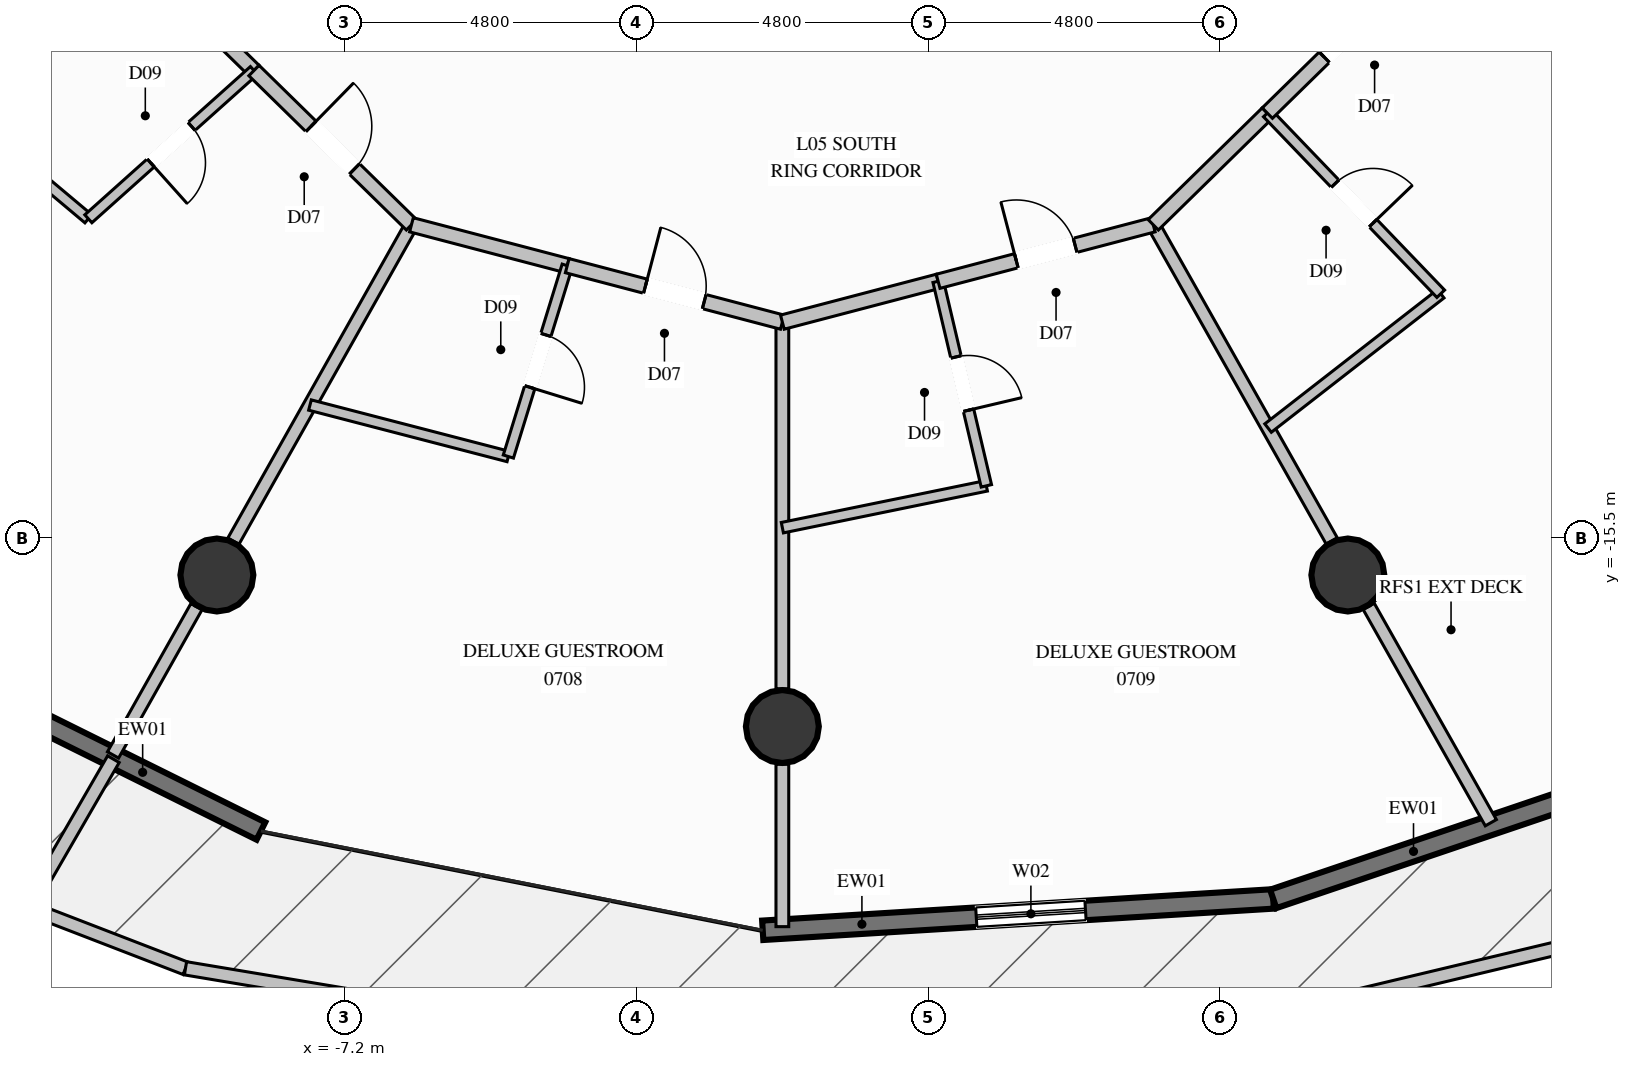
"""IFC4 building model, lengths in metres.
Left out: names, types, materials, properties, quantities, classifications, styles, units other than length and angle.
Written with IfcOpenShell. Run it as: python <this file> out.ifc"""

import sys

from ifc_helpers import new_model, si_unit, direction, frame, frame_2d, origin, origin_2d, place, context, subcontext, project, spatial, rectangle, circle, extrude, element, fill, save


model = new_model("IFC4")
c1 = context("Model", 3, precision=1e-05, world=origin(), true_north=direction((0.0, 1.0)))
c2 = subcontext(c1, "Body", "Model", "MODEL_VIEW")
j1 = project(units=[si_unit("LENGTHUNIT", "METRE"), si_unit("PLANEANGLEUNIT", "RADIAN")], contexts=[c1])
p1 = place(None, origin())
s1 = spatial("IfcSite", under=j1, at=p1, CompositionType="ELEMENT")
p2 = place(p1, origin())
s2 = spatial("IfcBuilding", under=s1, at=p2, CompositionType="ELEMENT")
p3 = place(p2, frame((0.0, 0.0, 28.4)))
s3 = spatial("IfcBuildingStorey", under=s2, at=p3, CompositionType="ELEMENT", Elevation=28.4)
for number, where, z_axis, x_axis in (
    (1, (-9.3, -16.108, 0.0), (0.0, 0.0, 1.0), (1.0, 0.0, 0.0)),
    (2, (0.0, -18.6, 0.0), (0.0, 0.0, 1.0), (1.0, 0.0, 0.0)),
    (3, (9.3, -16.108, 0.0), (0.0, 0.0, 1.0), (1.0, 0.0, 0.0)),
):
    element("IfcColumn", number, at=place(p3, frame(where, z_axis=z_axis, x_axis=x_axis)), inside=s3, PredefinedType="COLUMN", context=c2, shape_type="SweptSolid", body=[
        extrude(circle(Radius=0.6, at=origin_2d()), origin(), (0.0, 0.0, 1.0), 3.6),
    ])
p4 = place(p3, frame((-8.576, -20.318, 0.0), z_axis=(0.0, 0.0, 1.0), x_axis=(-0.895818759339, 0.444419565743, 0.0)))
e4 = element("IfcWall", 4, at=p4, inside=s3, PredefinedType="SOLIDWALL", context=c2, shape_type="SweptSolid", body=[
    extrude(rectangle(XDim=8.15, YDim=0.32, at=frame_2d((4.075, 0.0))), origin(), (0.0, 0.0, 1.0), 3.34),
])
p5 = place(p4, frame((4.592, 0.0, 0.35)))
e5 = element("IfcOpeningElement", 5, at=p5, cuts=e4, PredefinedType="OPENING", context=c2, shape_type="SweptSolid", body=[
    extrude(rectangle(XDim=1.8, YDim=2.6, at=frame_2d((0.9, 1.3))), frame((0.0, 0.17, 0.0), z_axis=(0.0, -1.0, 0.0), x_axis=(1.0, 0.0, 0.0)), (0.0, 0.0, 1.0), 0.34),
])
p6 = place(p3, frame((8.073, -21.435, 0.0), z_axis=(0.0, 0.0, 1.0), x_axis=(-0.998117750792, -0.06132663005, 0.0)))
e6 = element("IfcWall", 6, at=p6, inside=s3, PredefinedType="SOLIDWALL", context=c2, shape_type="SweptSolid", body=[
    extrude(rectangle(XDim=8.412, YDim=0.32, at=frame_2d((4.206, 0.0))), origin(), (0.0, 0.0, 1.0), 3.34),
])
p7 = place(p6, frame((3.093, 0.0, 0.35)))
e7 = element("IfcOpeningElement", 7, at=p7, cuts=e6, PredefinedType="OPENING", context=c2, shape_type="SweptSolid", body=[
    extrude(rectangle(XDim=1.8, YDim=2.6, at=frame_2d((0.9, 1.3))), frame((0.0, 0.17, 0.0), z_axis=(0.0, -1.0, 0.0), x_axis=(1.0, 0.0, 0.0)), (0.0, 0.0, 1.0), 0.34),
])
p8 = place(p3, frame((15.793, -18.821, 0.0), z_axis=(0.0, 0.0, 1.0), x_axis=(-0.94717495877, -0.320717317085, 0.0)))
e8 = element("IfcWall", 8, at=p8, inside=s3, PredefinedType="SOLIDWALL", context=c2, shape_type="SweptSolid", body=[
    extrude(rectangle(XDim=8.151, YDim=0.32, at=frame_2d((4.075, 0.0))), origin(), (0.0, 0.0, 1.0), 3.34),
])
p9 = place(p8, frame((1.229, 0.0, 0.35)))
e9 = element("IfcOpeningElement", 9, at=p9, cuts=e8, PredefinedType="OPENING", context=c2, shape_type="SweptSolid", body=[
    extrude(rectangle(XDim=1.8, YDim=2.6, at=frame_2d((0.9, 1.3))), frame((0.0, 0.17, 0.0), z_axis=(0.0, -1.0, 0.0), x_axis=(1.0, 0.0, 0.0)), (0.0, 0.0, 1.0), 0.34),
])
p10 = place(p3, frame((-11.002, -19.137, 0.0), z_axis=(0.0, 0.0, 1.0), x_axis=(-0.500102771102, -0.86596606073, 0.0)))
e10 = element("IfcWall", 10, at=p10, inside=s3, PredefinedType="PARAPET", context=c2, shape_type="SweptSolid", body=[
    extrude(rectangle(XDim=2.815, YDim=0.22, at=frame_2d((1.408, 0.0))), origin(), (0.0, 0.0, 1.0), 1.15),
])
p11 = place(p3, frame((-12.41, -21.575, 0.0), z_axis=(0.0, 0.0, 1.0), x_axis=(0.932949001639, -0.360008555927, 0.0)))
e11 = element("IfcWall", 11, at=p11, inside=s3, PredefinedType="PARAPET", context=c2, shape_type="SweptSolid", body=[
    extrude(rectangle(XDim=2.781, YDim=0.22, at=frame_2d((1.39, 0.0))), origin(), (0.0, 0.0, 1.0), 1.15),
])
p12 = place(p3, frame((-9.816, -22.576, 0.0), z_axis=(0.0, 0.0, 1.0), x_axis=(0.98635584135, -0.164627319226, 0.0)))
e12 = element("IfcWall", 12, at=p12, inside=s3, PredefinedType="PARAPET", context=c2, shape_type="SweptSolid", body=[
    extrude(rectangle(XDim=8.323, YDim=0.22, at=frame_2d((4.161, 0.0))), origin(), (0.0, 0.0, 1.0), 1.15),
])
p13 = place(p3, frame((6.711, -23.685, 0.0), z_axis=(0.0, 0.0, 1.0), x_axis=(0.972686482299, 0.232122827727, 0.0)))
e13 = element("IfcWall", 13, at=p13, inside=s3, PredefinedType="PARAPET", context=c2, shape_type="SweptSolid", body=[
    extrude(rectangle(XDim=8.082, YDim=0.22, at=frame_2d((4.041, 0.0))), origin(), (0.0, 0.0, 1.0), 1.15),
])
p14 = place(p3, frame((-10.566, -5.975, 0.0), z_axis=(0.0, 0.0, 1.0), x_axis=(-0.861473203585, -0.507803032194, 0.0)))
e14 = element("IfcWall", 14, at=p14, inside=s3, PredefinedType="PARTITIONING", context=c2, shape_type="SweptSolid", body=[
    extrude(rectangle(XDim=5.845, YDim=0.21, at=frame_2d((2.922, 0.0))), origin(), (0.0, 0.0, 1.0), 2.708),
])
p15 = place(p3, frame((-6.1, -10.349, 0.0), z_axis=(0.0, 0.0, 1.0), x_axis=(-0.490503945764, -0.871438970433, 0.0)))
e15 = element("IfcWall", 15, at=p15, inside=s3, PredefinedType="PARTITIONING", context=c2, shape_type="SweptSolid", body=[
    extrude(rectangle(XDim=5.969, YDim=0.21, at=frame_2d((2.985, 0.0))), origin(), (0.0, 0.0, 1.0), 2.708),
])
p16 = place(p3, frame((-9.636, -16.629, 0.0), z_axis=(0.0, 0.0, 1.0), x_axis=(-0.490451821351, -0.871468307475, 0.0)))
e16 = element("IfcWall", 16, at=p16, inside=s3, PredefinedType="PARTITIONING", context=c2, shape_type="SweptSolid", body=[
    extrude(rectangle(XDim=2.798, YDim=0.21, at=frame_2d((1.399, 0.0))), origin(), (0.0, 0.0, 1.0), 3.34),
])
p17 = place(p3, frame((0.0, -11.95, 0.0), z_axis=(0.0, 0.0, 1.0), x_axis=(0.0, -1.0, 0.0)))
e17 = element("IfcWall", 17, at=p17, inside=s3, PredefinedType="PARTITIONING", context=c2, shape_type="SweptSolid", body=[
    extrude(rectangle(XDim=6.03, YDim=0.21, at=frame_2d((3.015, 0.0))), origin(), (0.0, 0.0, 1.0), 2.708),
])
p18 = place(p3, frame((0.0, -19.22, 0.0), z_axis=(0.0, 0.0, 1.0), x_axis=(0.0, -1.0, 0.0)))
e18 = element("IfcWall", 18, at=p18, inside=s3, PredefinedType="PARTITIONING", context=c2, shape_type="SweptSolid", body=[
    extrude(rectangle(XDim=2.671, YDim=0.21, at=frame_2d((1.335, 0.0))), origin(), (0.0, 0.0, 1.0), 3.34),
])
p19 = place(p3, frame((6.1, -10.349, 0.0), z_axis=(0.0, 0.0, 1.0), x_axis=(0.491652896219, -0.870791266401, 0.0)))
e19 = element("IfcWall", 19, at=p19, inside=s3, PredefinedType="PARTITIONING", context=c2, shape_type="SweptSolid", body=[
    extrude(rectangle(XDim=5.969, YDim=0.21, at=frame_2d((2.985, 0.0))), origin(), (0.0, 0.0, 1.0), 2.708),
])
p20 = place(p3, frame((9.643, -16.624, 0.0), z_axis=(0.0, 0.0, 1.0), x_axis=(0.491698874435, -0.87076530528, 0.0)))
e20 = element("IfcWall", 20, at=p20, inside=s3, PredefinedType="PARTITIONING", context=c2, shape_type="SweptSolid", body=[
    extrude(rectangle(XDim=4.086, YDim=0.21, at=frame_2d((2.043, 0.0))), origin(), (0.0, 0.0, 1.0), 3.34),
])
p21 = place(p3, frame((10.566, -5.975, 0.0), z_axis=(0.0, 0.0, 1.0), x_axis=(0.862217531027, -0.506538181374, 0.0)))
e21 = element("IfcWall", 21, at=p21, inside=s3, PredefinedType="PARTITIONING", context=c2, shape_type="SweptSolid", body=[
    extrude(rectangle(XDim=5.845, YDim=0.21, at=frame_2d((2.923, 0.0))), origin(), (0.0, 0.0, 1.0), 2.708),
])
p22 = place(p3, frame((-10.566, -5.975, 0.0), z_axis=(0.0, 0.0, 1.0), x_axis=(0.714506552913, -0.699628748584, 0.0)))
e22 = element("IfcWall", 22, at=p22, inside=s3, PredefinedType="PARTITIONING", context=c2, shape_type="SweptSolid", body=[
    extrude(rectangle(XDim=2.625, YDim=0.24, at=frame_2d((1.313, 0.0))), origin(), (0.0, 0.0, 1.0), 3.34),
])
p23 = place(p3, frame((-14.055, -8.032, 0.0), z_axis=(0.0, 0.0, 1.0), x_axis=(0.765749489357, -0.643138958196, 0.0)))
e23 = element("IfcWall", 23, at=p23, inside=s3, PredefinedType="PLUMBINGWALL", context=c2, shape_type="SweptSolid", body=[
    extrude(rectangle(XDim=3.449, YDim=0.175, at=frame_2d((1.724, 0.0))), origin(), (0.0, 0.0, 1.0), 3.34),
])
p24 = place(p3, frame((-8.69, -7.812, 0.0), z_axis=(0.0, 0.0, 1.0), x_axis=(-0.745157470099, -0.666888554975, 0.0)))
e24 = element("IfcWall", 24, at=p24, inside=s3, PredefinedType="PLUMBINGWALL", context=c2, shape_type="SweptSolid", body=[
    extrude(rectangle(XDim=3.656, YDim=0.175, at=frame_2d((1.828, 0.0))), origin(), (0.0, 0.0, 1.0), 3.34),
])
p25 = place(p24, frame((1.378, 0.0, 0.0)))
e25 = element("IfcOpeningElement", 25, at=p25, cuts=e24, PredefinedType="OPENING", context=c2, shape_type="SweptSolid", body=[
    extrude(rectangle(XDim=0.9, YDim=2.1, at=frame_2d((0.45, 1.05))), frame((0.0, 0.098, 0.0), z_axis=(0.0, -1.0, 0.0), x_axis=(1.0, 0.0, 0.0)), (0.0, 0.0, 1.0), 0.195),
])
p26 = place(p3, frame((-8.69, -7.812, 0.0), z_axis=(0.0, 0.0, 1.0), x_axis=(0.714342093268, -0.699796666029, 0.0)))
e26 = element("IfcWall", 26, at=p26, inside=s3, PredefinedType="PARTITIONING", context=c2, shape_type="SweptSolid", body=[
    extrude(rectangle(XDim=3.625, YDim=0.24, at=frame_2d((1.813, 0.0))), origin(), (0.0, 0.0, 1.0), 3.34),
])
p27 = place(p26, frame((1.313, 0.0, 0.0)))
e27 = element("IfcOpeningElement", 27, at=p27, cuts=e26, PredefinedType="OPENING", context=c2, shape_type="SweptSolid", body=[
    extrude(rectangle(XDim=1.0, YDim=2.2, at=frame_2d((0.5, 1.1))), frame((0.0, 0.13, 0.0), z_axis=(0.0, -1.0, 0.0), x_axis=(1.0, 0.0, 0.0)), (0.0, 0.0, 1.0), 0.26),
])
p28 = place(p3, frame((-6.1, -10.349, 0.0), z_axis=(0.0, 0.0, 1.0), x_axis=(0.967291490053, -0.253667446219, 0.0)))
e28 = element("IfcWall", 28, at=p28, inside=s3, PredefinedType="PARTITIONING", context=c2, shape_type="SweptSolid", body=[
    extrude(rectangle(XDim=2.649, YDim=0.24, at=frame_2d((1.324, 0.0))), origin(), (0.0, 0.0, 1.0), 3.34),
])
p29 = place(p3, frame((-7.769, -13.313, 0.0), z_axis=(0.0, 0.0, 1.0), x_axis=(0.96792648556, -0.251233593596, 0.0)))
e29 = element("IfcWall", 29, at=p29, inside=s3, PredefinedType="PLUMBINGWALL", context=c2, shape_type="SweptSolid", body=[
    extrude(rectangle(XDim=3.371, YDim=0.175, at=frame_2d((1.686, 0.0))), origin(), (0.0, 0.0, 1.0), 3.34),
])
p30 = place(p3, frame((-3.538, -11.021, 0.0), z_axis=(0.0, 0.0, 1.0), x_axis=(-0.294696857094, -0.955590792347, 0.0)))
e30 = element("IfcWall", 30, at=p30, inside=s3, PredefinedType="PLUMBINGWALL", context=c2, shape_type="SweptSolid", body=[
    extrude(rectangle(XDim=3.285, YDim=0.175, at=frame_2d((1.643, 0.0))), origin(), (0.0, 0.0, 1.0), 3.34),
])
p31 = place(p30, frame((1.192, 0.0, 0.0)))
e31 = element("IfcOpeningElement", 31, at=p31, cuts=e30, PredefinedType="OPENING", context=c2, shape_type="SweptSolid", body=[
    extrude(rectangle(XDim=0.9, YDim=2.1, at=frame_2d((0.45, 1.05))), frame((0.0, 0.098, 0.0), z_axis=(0.0, -1.0, 0.0), x_axis=(1.0, 0.0, 0.0)), (0.0, 0.0, 1.0), 0.195),
])
p32 = place(p3, frame((-3.538, -11.021, 0.0), z_axis=(0.0, 0.0, 1.0), x_axis=(0.96721703222, -0.253951201187, 0.0)))
e32 = element("IfcWall", 32, at=p32, inside=s3, PredefinedType="PARTITIONING", context=c2, shape_type="SweptSolid", body=[
    extrude(rectangle(XDim=3.658, YDim=0.24, at=frame_2d((1.829, 0.0))), origin(), (0.0, 0.0, 1.0), 2.919),
])
p33 = place(p32, frame((1.329, 0.0, 0.0)))
e33 = element("IfcOpeningElement", 33, at=p33, cuts=e32, PredefinedType="OPENING", context=c2, shape_type="SweptSolid", body=[
    extrude(rectangle(XDim=1.0, YDim=2.2, at=frame_2d((0.5, 1.1))), frame((0.0, 0.13, 0.0), z_axis=(0.0, -1.0, 0.0), x_axis=(1.0, 0.0, 0.0)), (0.0, 0.0, 1.0), 0.26),
])
p34 = place(p3, frame((0.0, -11.95, 0.0), z_axis=(0.0, 0.0, 1.0), x_axis=(0.967291490053, 0.253667446219, 0.0)))
e34 = element("IfcWall", 34, at=p34, inside=s3, PredefinedType="PARTITIONING", context=c2, shape_type="SweptSolid", body=[
    extrude(rectangle(XDim=2.649, YDim=0.24, at=frame_2d((1.324, 0.0))), origin(), (0.0, 0.0, 1.0), 2.919),
])
p35 = place(p3, frame((0.0, -15.33, 0.0), z_axis=(0.0, 0.0, 1.0), x_axis=(0.979614932167, 0.20088450581, 0.0)))
e35 = element("IfcWall", 35, at=p35, inside=s3, PredefinedType="PLUMBINGWALL", context=c2, shape_type="SweptSolid", body=[
    extrude(rectangle(XDim=3.425, YDim=0.175, at=frame_2d((1.712, 0.0))), origin(), (0.0, 0.0, 1.0), 3.34),
])
p36 = place(p3, frame((2.562, -11.278, 0.0), z_axis=(0.0, 0.0, 1.0), x_axis=(0.229433036384, -0.973324448381, 0.0)))
e36 = element("IfcWall", 36, at=p36, inside=s3, PredefinedType="PLUMBINGWALL", context=c2, shape_type="SweptSolid", body=[
    extrude(rectangle(XDim=3.456, YDim=0.175, at=frame_2d((1.728, 0.0))), origin(), (0.0, 0.0, 1.0), 3.34),
])
p37 = place(p36, frame((1.278, 0.0, 0.0)))
e37 = element("IfcOpeningElement", 37, at=p37, cuts=e36, PredefinedType="OPENING", context=c2, shape_type="SweptSolid", body=[
    extrude(rectangle(XDim=0.9, YDim=2.1, at=frame_2d((0.45, 1.05))), frame((0.0, 0.098, 0.0), z_axis=(0.0, -1.0, 0.0), x_axis=(1.0, 0.0, 0.0)), (0.0, 0.0, 1.0), 0.195),
])
p38 = place(p3, frame((2.562, -11.278, 0.0), z_axis=(0.0, 0.0, 1.0), x_axis=(0.96721703222, 0.253951201187, 0.0)))
e38 = element("IfcWall", 38, at=p38, inside=s3, PredefinedType="PARTITIONING", context=c2, shape_type="SweptSolid", body=[
    extrude(rectangle(XDim=3.658, YDim=0.24, at=frame_2d((1.829, 0.0))), origin(), (0.0, 0.0, 1.0), 2.919),
])
p39 = place(p38, frame((1.329, 0.0, 0.0)))
e39 = element("IfcOpeningElement", 39, at=p39, cuts=e38, PredefinedType="OPENING", context=c2, shape_type="SweptSolid", body=[
    extrude(rectangle(XDim=1.0, YDim=2.2, at=frame_2d((0.5, 1.1))), frame((0.0, 0.13, 0.0), z_axis=(0.0, -1.0, 0.0), x_axis=(1.0, 0.0, 0.0)), (0.0, 0.0, 1.0), 0.26),
])
p40 = place(p3, frame((6.1, -10.349, 0.0), z_axis=(0.0, 0.0, 1.0), x_axis=(0.714460071513, 0.69967621527, 0.0)))
e40 = element("IfcWall", 40, at=p40, inside=s3, PredefinedType="PARTITIONING", context=c2, shape_type="SweptSolid", body=[
    extrude(rectangle(XDim=2.626, YDim=0.24, at=frame_2d((1.313, 0.0))), origin(), (0.0, 0.0, 1.0), 3.34),
])
p41 = place(p3, frame((7.988, -13.692, 0.0), z_axis=(0.0, 0.0, 1.0), x_axis=(0.78932298539, 0.613978195651, 0.0)))
e41 = element("IfcWall", 41, at=p41, inside=s3, PredefinedType="PLUMBINGWALL", context=c2, shape_type="SweptSolid", body=[
    extrude(rectangle(XDim=3.598, YDim=0.175, at=frame_2d((1.799, 0.0))), origin(), (0.0, 0.0, 1.0), 3.34),
])
p42 = place(p3, frame((7.976, -8.512, 0.0), z_axis=(0.0, 0.0, 1.0), x_axis=(0.692493571669, -0.721424045342, 0.0)))
e42 = element("IfcWall", 42, at=p42, inside=s3, PredefinedType="PLUMBINGWALL", context=c2, shape_type="SweptSolid", body=[
    extrude(rectangle(XDim=4.118, YDim=0.175, at=frame_2d((2.059, 0.0))), origin(), (0.0, 0.0, 1.0), 3.34),
])
p43 = place(p42, frame((1.609, 0.0, 0.0)))
e43 = element("IfcOpeningElement", 43, at=p43, cuts=e42, PredefinedType="OPENING", context=c2, shape_type="SweptSolid", body=[
    extrude(rectangle(XDim=0.9, YDim=2.1, at=frame_2d((0.45, 1.05))), frame((0.0, 0.098, 0.0), z_axis=(0.0, -1.0, 0.0), x_axis=(1.0, 0.0, 0.0)), (0.0, 0.0, 1.0), 0.195),
])
p44 = place(p3, frame((7.976, -8.512, 0.0), z_axis=(0.0, 0.0, 1.0), x_axis=(0.714375756875, 0.699762301064, 0.0)))
e44 = element("IfcWall", 44, at=p44, inside=s3, PredefinedType="PARTITIONING", context=c2, shape_type="SweptSolid", body=[
    extrude(rectangle(XDim=3.625, YDim=0.24, at=frame_2d((1.812, 0.0))), origin(), (0.0, 0.0, 1.0), 3.34),
])
p45 = place(p44, frame((1.313, 0.0, 0.0)))
e45 = element("IfcOpeningElement", 45, at=p45, cuts=e44, PredefinedType="OPENING", context=c2, shape_type="SweptSolid", body=[
    extrude(rectangle(XDim=1.0, YDim=2.2, at=frame_2d((0.5, 1.1))), frame((0.0, 0.13, 0.0), z_axis=(0.0, -1.0, 0.0), x_axis=(1.0, 0.0, 0.0)), (0.0, 0.0, 1.0), 0.26),
])
p46 = place(p7, origin())
e46 = element("IfcWindow", 46, at=p46, inside=s3, PartitioningType="SINGLE_PANEL", PredefinedType="WINDOW", context=c2, shape_type="SweptSolid", body=[
    extrude(rectangle(XDim=1.8, YDim=2.6, at=frame_2d((0.9, 1.3))), frame((0.0, 0.03, 0.0), z_axis=(0.0, -1.0, 0.0), x_axis=(1.0, 0.0, 0.0)), (0.0, 0.0, 1.0), 0.06),
])
fill(e7, e46)
p47 = place(p25, origin())
e47 = element("IfcDoor", 47, at=p47, inside=s3, OperationType="SINGLE_SWING_RIGHT", PredefinedType="DOOR", context=c2, shape_type="SweptSolid", body=[
    extrude(rectangle(XDim=0.9, YDim=2.1, at=frame_2d((0.45, 1.05))), frame((0.0, 0.025, 0.0), z_axis=(0.0, -1.0, 0.0), x_axis=(1.0, 0.0, 0.0)), (0.0, 0.0, 1.0), 0.05),
])
fill(e25, e47)
p48 = place(p27, origin())
e48 = element("IfcDoor", 48, at=p48, inside=s3, OperationType="SINGLE_SWING_LEFT", PredefinedType="DOOR", context=c2, shape_type="SweptSolid", body=[
    extrude(rectangle(XDim=1.0, YDim=2.2, at=frame_2d((0.5, 1.1))), frame((0.0, 0.025, 0.0), z_axis=(0.0, -1.0, 0.0), x_axis=(1.0, 0.0, 0.0)), (0.0, 0.0, 1.0), 0.05),
])
fill(e27, e48)
p49 = place(p31, origin())
e49 = element("IfcDoor", 49, at=p49, inside=s3, OperationType="SINGLE_SWING_RIGHT", PredefinedType="DOOR", context=c2, shape_type="SweptSolid", body=[
    extrude(rectangle(XDim=0.9, YDim=2.1, at=frame_2d((0.45, 1.05))), frame((0.0, 0.025, 0.0), z_axis=(0.0, -1.0, 0.0), x_axis=(1.0, 0.0, 0.0)), (0.0, 0.0, 1.0), 0.05),
])
fill(e31, e49)
p50 = place(p33, origin())
e50 = element("IfcDoor", 50, at=p50, inside=s3, OperationType="SINGLE_SWING_LEFT", PredefinedType="DOOR", context=c2, shape_type="SweptSolid", body=[
    extrude(rectangle(XDim=1.0, YDim=2.2, at=frame_2d((0.5, 1.1))), frame((0.0, 0.025, 0.0), z_axis=(0.0, -1.0, 0.0), x_axis=(1.0, 0.0, 0.0)), (0.0, 0.0, 1.0), 0.05),
])
fill(e33, e50)
p51 = place(p37, origin())
e51 = element("IfcDoor", 51, at=p51, inside=s3, OperationType="SINGLE_SWING_RIGHT", PredefinedType="DOOR", context=c2, shape_type="SweptSolid", body=[
    extrude(rectangle(XDim=0.9, YDim=2.1, at=frame_2d((0.45, 1.05))), frame((0.0, 0.025, 0.0), z_axis=(0.0, -1.0, 0.0), x_axis=(1.0, 0.0, 0.0)), (0.0, 0.0, 1.0), 0.05),
])
fill(e37, e51)
p52 = place(p39, origin())
e52 = element("IfcDoor", 52, at=p52, inside=s3, OperationType="SINGLE_SWING_LEFT", PredefinedType="DOOR", context=c2, shape_type="SweptSolid", body=[
    extrude(rectangle(XDim=1.0, YDim=2.2, at=frame_2d((0.5, 1.1))), frame((0.0, 0.025, 0.0), z_axis=(0.0, -1.0, 0.0), x_axis=(1.0, 0.0, 0.0)), (0.0, 0.0, 1.0), 0.05),
])
fill(e39, e52)
p53 = place(p43, origin())
e53 = element("IfcDoor", 53, at=p53, inside=s3, OperationType="SINGLE_SWING_RIGHT", PredefinedType="DOOR", context=c2, shape_type="SweptSolid", body=[
    extrude(rectangle(XDim=0.9, YDim=2.1, at=frame_2d((0.45, 1.05))), frame((0.0, 0.025, 0.0), z_axis=(0.0, -1.0, 0.0), x_axis=(1.0, 0.0, 0.0)), (0.0, 0.0, 1.0), 0.05),
])
fill(e43, e53)
p54 = place(p45, origin())
e54 = element("IfcDoor", 54, at=p54, inside=s3, OperationType="SINGLE_SWING_LEFT", PredefinedType="DOOR", context=c2, shape_type="SweptSolid", body=[
    extrude(rectangle(XDim=1.0, YDim=2.2, at=frame_2d((0.5, 1.1))), frame((0.0, 0.025, 0.0), z_axis=(0.0, -1.0, 0.0), x_axis=(1.0, 0.0, 0.0)), (0.0, 0.0, 1.0), 0.05),
])
fill(e45, e54)
save(model, sys.argv[1])
